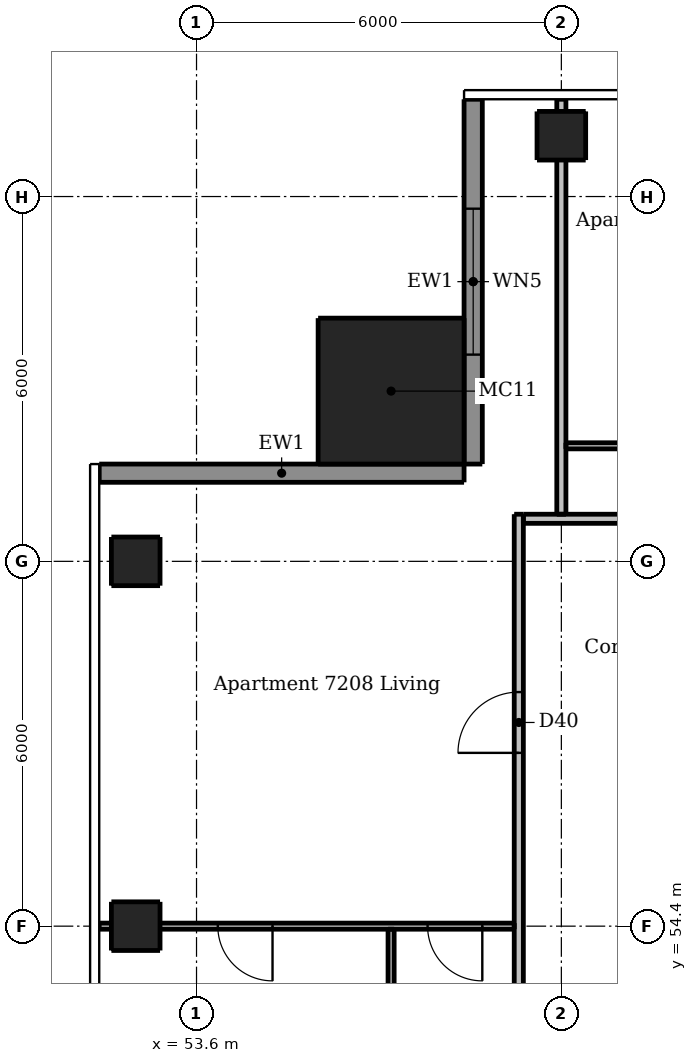
"""IFC4 building model, lengths in metres.
Left out: names, types, materials, properties, quantities, classifications, styles, units other than length and angle.
Written with IfcOpenShell. Run it as: python <this file> out.ifc"""

import sys

from ifc_helpers import new_model, si_unit, direction, frame, frame_2d, origin, origin_2d, place, context, subcontext, project, spatial, rectangle, extrude, element, fill, save


model = new_model("IFC4")
c1 = context("Model", 3, precision=1e-05, world=origin(), true_north=direction((0.0, 1.0)))
c2 = subcontext(c1, "Body", "Model", "MODEL_VIEW")
j1 = project(units=[si_unit("LENGTHUNIT", "METRE"), si_unit("PLANEANGLEUNIT", "RADIAN")], contexts=[c1])
p1 = place(None, origin())
s1 = spatial("IfcSite", under=j1, at=p1, CompositionType="ELEMENT")
p2 = place(p1, origin())
s2 = spatial("IfcBuilding", under=s1, at=p2, CompositionType="ELEMENT")
p3 = place(p2, frame((0.0, 0.0, 268.6)))
s3 = spatial("IfcBuildingStorey", under=s2, at=p3, CompositionType="ELEMENT", Elevation=268.6)
for number, where, z_axis, x_axis in (
    (1, (59.6, 67.4, 0.0), (0.0, 0.0, 1.0), (1.0, 0.0, 0.0)),
    (2, (52.6, 54.4, 0.0), (0.0, 0.0, 1.0), (1.0, 0.0, 0.0)),
    (3, (52.6, 60.4, 0.0), (0.0, 0.0, 1.0), (1.0, 0.0, 0.0)),
):
    element("IfcColumn", number, at=place(p3, frame(where, z_axis=z_axis, x_axis=x_axis)), inside=s3, PredefinedType="COLUMN", context=c2, shape_type="SweptSolid", body=[
        extrude(rectangle(XDim=0.8, YDim=0.8, at=origin_2d()), origin(), (0.0, 0.0, 1.0), 3.05),
    ])
p4 = place(p3, frame((56.8, 63.2, 0.0), z_axis=(0.0, 0.0, 1.0), x_axis=(1.0, 0.0, 0.0)))
e4 = element("IfcColumn", 4, at=p4, inside=s3, PredefinedType="COLUMN", context=c2, shape_type="SweptSolid", body=[
    extrude(rectangle(XDim=2.4, YDim=2.4, at=origin_2d()), origin(), (0.0, 0.0, 1.0), 3.3),
])
p5 = place(p3, frame((58.15, 68.0, 0.0), z_axis=(0.0, 0.0, 1.0), x_axis=(0.0, -1.0, 0.0)))
e5 = element("IfcWall", 5, at=p5, inside=s3, PredefinedType="SOLIDWALL", context=c2, shape_type="SweptSolid", body=[
    extrude(rectangle(XDim=6.0, YDim=0.3, at=frame_2d((3.0, 0.0))), origin(), (0.0, 0.0, 1.0), 3.05),
])
p6 = place(p5, frame((1.8, 0.0, 0.15)))
e6 = element("IfcOpeningElement", 6, at=p6, cuts=e5, PredefinedType="OPENING", context=c2, shape_type="SweptSolid", body=[
    extrude(rectangle(XDim=2.4, YDim=2.1, at=frame_2d((1.2, 1.05))), frame((0.0, 0.16, 0.0), z_axis=(0.0, -1.0, 0.0), x_axis=(1.0, 0.0, 0.0)), (0.0, 0.0, 1.0), 0.32),
])
p7 = place(p3, frame((58.0, 61.85, 0.0), z_axis=(0.0, 0.0, 1.0), x_axis=(-1.0, 0.0, 0.0)))
e7 = element("IfcWall", 7, at=p7, inside=s3, PredefinedType="SOLIDWALL", context=c2, shape_type="SweptSolid", body=[
    extrude(rectangle(XDim=6.0, YDim=0.3, at=frame_2d((3.0, 0.0))), origin(), (0.0, 0.0, 1.0), 3.05),
])
p8 = place(p3, frame((56.8, 54.35, 0.0), z_axis=(0.0, 0.0, 1.0), x_axis=(0.0, -1.0, 0.0)))
e8 = element("IfcWall", 8, at=p8, inside=s3, PredefinedType="PARTITIONING", context=c2, shape_type="SweptSolid", body=[
    extrude(rectangle(XDim=5.875, YDim=0.1, at=frame_2d((2.938, 0.0))), origin(), (0.0, 0.0, 1.0), 3.05),
])
p9 = place(p8, frame((3.75, 0.0, 0.0)))
e9 = element("IfcOpeningElement", 9, at=p9, cuts=e8, PredefinedType="OPENING", context=c2, shape_type="SweptSolid", body=[
    extrude(rectangle(XDim=0.8, YDim=2.1, at=frame_2d((0.4, 1.05))), frame((0.0, 0.06, 0.0), z_axis=(0.0, -1.0, 0.0), x_axis=(1.0, 0.0, 0.0)), (0.0, 0.0, 1.0), 0.12),
])
p10 = place(p3, frame((59.675, 62.3, 0.0), z_axis=(0.0, 0.0, 1.0), x_axis=(1.0, 0.0, 0.0)))
e10 = element("IfcWall", 10, at=p10, inside=s3, PredefinedType="PARTITIONING", context=c2, shape_type="SweptSolid", body=[
    extrude(rectangle(XDim=17.85, YDim=0.1, at=frame_2d((8.925, 0.0))), origin(), (0.0, 0.0, 1.0), 3.05),
])
p11 = place(p10, frame((9.975, 0.0, 0.0)))
e11 = element("IfcOpeningElement", 11, at=p11, cuts=e10, PredefinedType="OPENING", context=c2, shape_type="SweptSolid", body=[
    extrude(rectangle(XDim=0.9, YDim=2.1, at=frame_2d((0.45, 1.05))), frame((0.0, 0.06, 0.0), z_axis=(0.0, -1.0, 0.0), x_axis=(1.0, 0.0, 0.0)), (0.0, 0.0, 1.0), 0.12),
])
p12 = place(p10, frame((15.975, 0.0, 0.0)))
e12 = element("IfcOpeningElement", 12, at=p12, cuts=e10, PredefinedType="OPENING", context=c2, shape_type="SweptSolid", body=[
    extrude(rectangle(XDim=0.9, YDim=2.1, at=frame_2d((0.45, 1.05))), frame((0.0, 0.06, 0.0), z_axis=(0.0, -1.0, 0.0), x_axis=(1.0, 0.0, 0.0)), (0.0, 0.0, 1.0), 0.12),
])
p13 = place(p10, frame((13.575, 0.0, 0.0)))
e13 = element("IfcOpeningElement", 13, at=p13, cuts=e10, PredefinedType="OPENING", context=c2, shape_type="SweptSolid", body=[
    extrude(rectangle(XDim=0.9, YDim=2.1, at=frame_2d((0.45, 1.05))), frame((0.0, 0.06, 0.0), z_axis=(0.0, -1.0, 0.0), x_axis=(1.0, 0.0, 0.0)), (0.0, 0.0, 1.0), 0.12),
])
p14 = place(p10, frame((6.375, 0.0, 0.0)))
e14 = element("IfcOpeningElement", 14, at=p14, cuts=e10, PredefinedType="OPENING", context=c2, shape_type="SweptSolid", body=[
    extrude(rectangle(XDim=0.9, YDim=2.1, at=frame_2d((0.45, 1.05))), frame((0.0, 0.06, 0.0), z_axis=(0.0, -1.0, 0.0), x_axis=(1.0, 0.0, 0.0)), (0.0, 0.0, 1.0), 0.12),
])
p15 = place(p10, frame((1.275, 0.0, 0.0)))
e15 = element("IfcOpeningElement", 15, at=p15, cuts=e10, PredefinedType="OPENING", context=c2, shape_type="SweptSolid", body=[
    extrude(rectangle(XDim=0.9, YDim=2.1, at=frame_2d((0.45, 1.05))), frame((0.0, 0.06, 0.0), z_axis=(0.0, -1.0, 0.0), x_axis=(1.0, 0.0, 0.0)), (0.0, 0.0, 1.0), 0.12),
])
p16 = place(p10, frame((4.325, 0.0, 0.0)))
e16 = element("IfcOpeningElement", 16, at=p16, cuts=e10, PredefinedType="OPENING", context=c2, shape_type="SweptSolid", body=[
    extrude(rectangle(XDim=0.8, YDim=2.1, at=frame_2d((0.4, 1.05))), frame((0.0, 0.06, 0.0), z_axis=(0.0, -1.0, 0.0), x_axis=(1.0, 0.0, 0.0)), (0.0, 0.0, 1.0), 0.12),
])
p17 = place(p3, frame((58.825, 54.4, 0.0), z_axis=(0.0, 0.0, 1.0), x_axis=(-1.0, 0.0, 0.0)))
e17 = element("IfcWall", 17, at=p17, inside=s3, PredefinedType="PARTITIONING", context=c2, shape_type="SweptSolid", body=[
    extrude(rectangle(XDim=6.825, YDim=0.1, at=frame_2d((3.413, 0.0))), origin(), (0.0, 0.0, 1.0), 2.516),
])
p18 = place(p17, frame((0.525, 0.0, 0.0)))
e18 = element("IfcOpeningElement", 18, at=p18, cuts=e17, PredefinedType="OPENING", context=c2, shape_type="SweptSolid", body=[
    extrude(rectangle(XDim=0.9, YDim=2.1, at=frame_2d((0.45, 1.05))), frame((0.0, 0.06, 0.0), z_axis=(0.0, -1.0, 0.0), x_axis=(1.0, 0.0, 0.0)), (0.0, 0.0, 1.0), 0.12),
])
p19 = place(p17, frame((3.975, 0.0, 0.0)))
e19 = element("IfcOpeningElement", 19, at=p19, cuts=e17, PredefinedType="OPENING", context=c2, shape_type="SweptSolid", body=[
    extrude(rectangle(XDim=0.9, YDim=2.1, at=frame_2d((0.45, 1.05))), frame((0.0, 0.06, 0.0), z_axis=(0.0, -1.0, 0.0), x_axis=(1.0, 0.0, 0.0)), (0.0, 0.0, 1.0), 0.12),
])
p20 = place(p3, frame((58.9, 30.325, 0.0), z_axis=(0.0, 0.0, 1.0), x_axis=(0.0, 1.0, 0.0)))
e20 = element("IfcWall", 20, at=p20, inside=s3, PredefinedType="PARTITIONING", context=c2, shape_type="SweptSolid", body=[
    extrude(rectangle(XDim=30.85, YDim=0.15, at=frame_2d((15.425, 0.0))), origin(), (0.0, 0.0, 1.0), 3.05),
])
p21 = place(p20, frame((9.225, 0.0, 0.0)))
e21 = element("IfcOpeningElement", 21, at=p21, cuts=e20, PredefinedType="OPENING", context=c2, shape_type="SweptSolid", body=[
    extrude(rectangle(XDim=1.0, YDim=2.1, at=frame_2d((0.5, 1.05))), frame((0.0, 0.085, 0.0), z_axis=(0.0, -1.0, 0.0), x_axis=(1.0, 0.0, 0.0)), (0.0, 0.0, 1.0), 0.17),
])
p22 = place(p20, frame((26.925, 0.0, 0.0)))
e22 = element("IfcOpeningElement", 22, at=p22, cuts=e20, PredefinedType="OPENING", context=c2, shape_type="SweptSolid", body=[
    extrude(rectangle(XDim=1.0, YDim=2.1, at=frame_2d((0.5, 1.05))), frame((0.0, 0.085, 0.0), z_axis=(0.0, -1.0, 0.0), x_axis=(1.0, 0.0, 0.0)), (0.0, 0.0, 1.0), 0.17),
])
p23 = place(p3, frame((59.6, 61.175, 0.0), z_axis=(0.0, 0.0, 1.0), x_axis=(0.0, 1.0, 0.0)))
e23 = element("IfcWall", 23, at=p23, inside=s3, PredefinedType="PARTITIONING", context=c2, shape_type="SweptSolid", body=[
    extrude(rectangle(XDim=6.825, YDim=0.15, at=frame_2d((3.413, 0.0))), origin(), (0.0, 0.0, 1.0), 2.51),
])
p24 = place(p3, frame((58.975, 61.1, 0.0), z_axis=(0.0, 0.0, 1.0), x_axis=(1.0, 0.0, 0.0)))
e24 = element("IfcWall", 24, at=p24, inside=s3, PredefinedType="PARTITIONING", context=c2, shape_type="SweptSolid", body=[
    extrude(rectangle(XDim=29.25, YDim=0.15, at=frame_2d((14.625, 0.0))), origin(), (0.0, 0.0, 1.0), 3.05),
])
p25 = place(p24, frame((9.125, 0.0, 0.0)))
e25 = element("IfcOpeningElement", 25, at=p25, cuts=e24, PredefinedType="OPENING", context=c2, shape_type="SweptSolid", body=[
    extrude(rectangle(XDim=1.0, YDim=2.1, at=frame_2d((0.5, 1.05))), frame((0.0, 0.085, 0.0), z_axis=(0.0, -1.0, 0.0), x_axis=(1.0, 0.0, 0.0)), (0.0, 0.0, 1.0), 0.17),
])
p26 = place(p24, frame((26.475, 0.0, 0.0)))
e26 = element("IfcOpeningElement", 26, at=p26, cuts=e24, PredefinedType="OPENING", context=c2, shape_type="SweptSolid", body=[
    extrude(rectangle(XDim=1.0, YDim=2.1, at=frame_2d((0.5, 1.05))), frame((0.0, 0.085, 0.0), z_axis=(0.0, -1.0, 0.0), x_axis=(1.0, 0.0, 0.0)), (0.0, 0.0, 1.0), 0.17),
])
p27 = place(p6, origin())
e27 = element("IfcWindow", 27, at=p27, inside=s3, PartitioningType="DOUBLE_PANEL_VERTICAL", PredefinedType="WINDOW", context=c2, shape_type="SweptSolid", body=[
    extrude(rectangle(XDim=2.4, YDim=2.1, at=frame_2d((1.2, 1.05))), frame((0.0, 0.03, 0.0), z_axis=(0.0, -1.0, 0.0), x_axis=(1.0, 0.0, 0.0)), (0.0, 0.0, 1.0), 0.06),
])
fill(e6, e27)
p28 = place(p22, origin())
e28 = element("IfcDoor", 28, at=p28, inside=s3, OperationType="SINGLE_SWING_LEFT", PredefinedType="DOOR", context=c2, shape_type="SweptSolid", body=[
    extrude(rectangle(XDim=1.0, YDim=2.1, at=frame_2d((0.5, 1.05))), frame((0.0, 0.025, 0.0), z_axis=(0.0, -1.0, 0.0), x_axis=(1.0, 0.0, 0.0)), (0.0, 0.0, 1.0), 0.05),
])
fill(e22, e28)
p29 = place(p18, origin())
e29 = element("IfcDoor", 29, at=p29, inside=s3, OperationType="SINGLE_SWING_LEFT", PredefinedType="DOOR", context=c2, shape_type="SweptSolid", body=[
    extrude(rectangle(XDim=0.9, YDim=2.1, at=frame_2d((0.45, 1.05))), frame((0.0, 0.025, 0.0), z_axis=(0.0, -1.0, 0.0), x_axis=(1.0, 0.0, 0.0)), (0.0, 0.0, 1.0), 0.05),
])
fill(e18, e29)
p30 = place(p19, origin())
e30 = element("IfcDoor", 30, at=p30, inside=s3, OperationType="SINGLE_SWING_LEFT", PredefinedType="DOOR", context=c2, shape_type="SweptSolid", body=[
    extrude(rectangle(XDim=0.9, YDim=2.1, at=frame_2d((0.45, 1.05))), frame((0.0, 0.025, 0.0), z_axis=(0.0, -1.0, 0.0), x_axis=(1.0, 0.0, 0.0)), (0.0, 0.0, 1.0), 0.05),
])
fill(e19, e30)
save(model, sys.argv[1])
